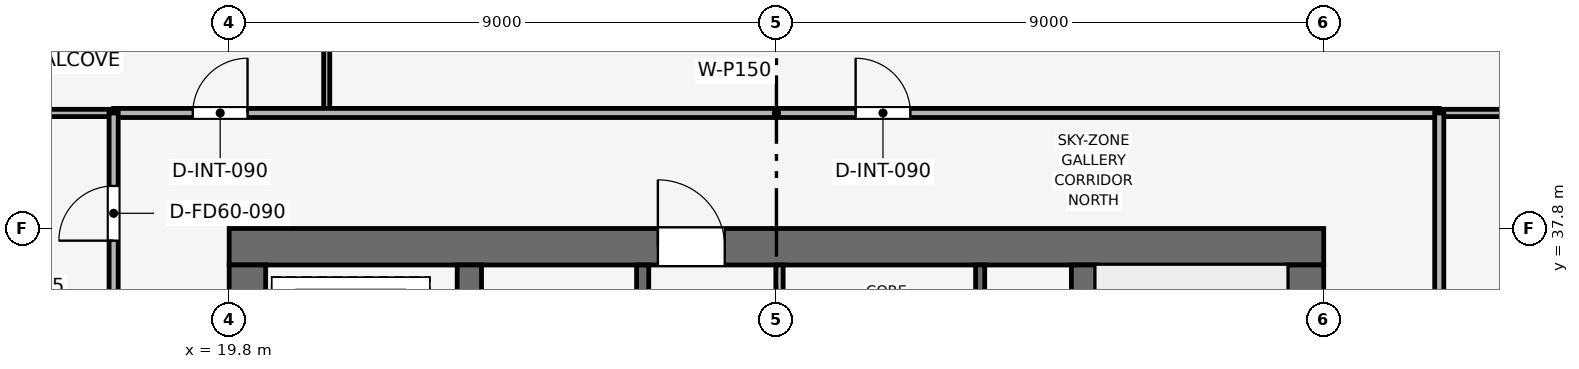
"""IFC4 building model, lengths in metres.
Left out: names, types, materials, properties, quantities, classifications, styles, units other than length and angle.
Written with IfcOpenShell. Run it as: python <this file> out.ifc"""

import sys

from ifc_helpers import new_model, si_unit, direction, frame, frame_2d, origin, place, context, subcontext, project, spatial, rectangle, extrude, element, fill, save


model = new_model("IFC4")
c1 = context("Model", 3, precision=1e-05, world=origin(), true_north=direction((0.0, 1.0)))
c2 = subcontext(c1, "Body", "Model", "MODEL_VIEW")
j1 = project(units=[si_unit("LENGTHUNIT", "METRE"), si_unit("PLANEANGLEUNIT", "RADIAN")], contexts=[c1])
p1 = place(None, origin())
s1 = spatial("IfcSite", under=j1, at=p1, CompositionType="ELEMENT")
p2 = place(p1, origin())
s2 = spatial("IfcBuilding", under=s1, at=p2, CompositionType="ELEMENT")
p3 = place(p2, frame((0.0, 0.0, 306.75)))
s3 = spatial("IfcBuildingStorey", under=s2, at=p3, CompositionType="ELEMENT", Elevation=306.75)
p4 = place(p3, frame((19.8, 37.5, 0.0), z_axis=(0.0, 0.0, 1.0), x_axis=(1.0, 0.0, 0.0)))
e1 = element("IfcWall", 1, at=p4, inside=s3, PredefinedType="SHEAR", context=c2, shape_type="SweptSolid", body=[
    extrude(rectangle(XDim=18.0, YDim=0.6, at=frame_2d((9.0, 0.0))), origin(), (0.0, 0.0, 1.0), 3.75),
])
p5 = place(p4, frame((7.05, 0.0, 0.0)))
e2 = element("IfcOpeningElement", 2, at=p5, cuts=e1, PredefinedType="OPENING", context=c2, shape_type="SweptSolid", body=[
    extrude(rectangle(XDim=1.1, YDim=2.15, at=frame_2d((0.55, 1.075))), frame((0.0, 0.31, 0.0), z_axis=(0.0, -1.0, 0.0), x_axis=(1.0, 0.0, 0.0)), (0.0, 0.0, 1.0), 0.62),
])
p6 = place(p3, frame((20.1, 20.4, 0.0), z_axis=(0.0, 0.0, 1.0), x_axis=(0.0, 1.0, 0.0)))
e3 = element("IfcWall", 3, at=p6, inside=s3, PredefinedType="SHEAR", context=c2, shape_type="SweptSolid", body=[
    extrude(rectangle(XDim=16.8, YDim=0.6, at=frame_2d((8.4, 0.0))), origin(), (0.0, 0.0, 1.0), 3.75),
])
p7 = place(p6, frame((10.4, 0.0, 0.0)))
e4 = element("IfcOpeningElement", 4, at=p7, cuts=e3, PredefinedType="OPENING", context=c2, shape_type="SweptSolid", body=[
    extrude(rectangle(XDim=1.1, YDim=2.15, at=frame_2d((0.55, 1.075))), frame((0.0, 0.31, 0.0), z_axis=(0.0, -1.0, 0.0), x_axis=(1.0, 0.0, 0.0)), (0.0, 0.0, 1.0), 0.62),
])
p8 = place(p3, frame((37.5, 20.4, 0.0), z_axis=(0.0, 0.0, 1.0), x_axis=(0.0, 1.0, 0.0)))
e5 = element("IfcWall", 5, at=p8, inside=s3, PredefinedType="SHEAR", context=c2, shape_type="SweptSolid", body=[
    extrude(rectangle(XDim=16.8, YDim=0.6, at=frame_2d((8.4, 0.0))), origin(), (0.0, 0.0, 1.0), 3.75),
])
p9 = place(p8, frame((4.9, 0.0, 0.0)))
e6 = element("IfcOpeningElement", 6, at=p9, cuts=e5, PredefinedType="OPENING", context=c2, shape_type="SweptSolid", body=[
    extrude(rectangle(XDim=1.1, YDim=2.15, at=frame_2d((0.55, 1.075))), frame((0.0, 0.31, 0.0), z_axis=(0.0, -1.0, 0.0), x_axis=(1.0, 0.0, 0.0)), (0.0, 0.0, 1.0), 0.62),
])
for number, where, z_axis, x_axis in (
    (7, (23.75, 20.4, 0.0), (0.0, 0.0, 1.0), (0.0, 1.0, 0.0)),
    (8, (33.85, 20.4, 0.0), (0.0, 0.0, 1.0), (0.0, 1.0, 0.0)),
):
    element("IfcWall", number, at=place(p3, frame(where, z_axis=z_axis, x_axis=x_axis)), inside=s3, PredefinedType="SHEAR", context=c2, shape_type="SweptSolid", body=[
        extrude(rectangle(XDim=16.8, YDim=0.4, at=frame_2d((8.4, 0.0))), origin(), (0.0, 0.0, 1.0), 3.75),
    ])
p10 = place(p3, frame((32.15, 34.0, 0.0), z_axis=(0.0, 0.0, 1.0), x_axis=(0.0, 1.0, 0.0)))
e9 = element("IfcWall", 9, at=p10, inside=s3, PredefinedType="SHEAR", context=c2, shape_type="SweptSolid", body=[
    extrude(rectangle(XDim=3.2, YDim=0.15, at=frame_2d((1.6, 0.0))), origin(), (0.0, 0.0, 1.0), 3.51),
])
p11 = place(p3, frame((26.6, 34.0, 0.0), z_axis=(0.0, 0.0, 1.0), x_axis=(0.0, 1.0, 0.0)))
e10 = element("IfcWall", 10, at=p11, inside=s3, PredefinedType="SHEAR", context=c2, shape_type="SweptSolid", body=[
    extrude(rectangle(XDim=3.2, YDim=0.2, at=frame_2d((1.6, 0.0))), origin(), (0.0, 0.0, 1.0), 3.51),
])
p12 = place(p11, frame((0.75, 0.0, 0.0)))
e11 = element("IfcOpeningElement", 11, at=p12, cuts=e10, PredefinedType="OPENING", context=c2, shape_type="SweptSolid", body=[
    extrude(rectangle(XDim=1.1, YDim=2.15, at=frame_2d((0.55, 1.075))), frame((0.0, 0.11, 0.0), z_axis=(0.0, -1.0, 0.0), x_axis=(1.0, 0.0, 0.0)), (0.0, 0.0, 1.0), 0.22),
])
p13 = place(p3, frame((28.85, 33.925, 0.0), z_axis=(0.0, 0.0, 1.0), x_axis=(0.0, 1.0, 0.0)))
e12 = element("IfcWall", 12, at=p13, inside=s3, PredefinedType="PARTITIONING", context=c2, shape_type="SweptSolid", body=[
    extrude(rectangle(XDim=3.275, YDim=0.12, at=frame_2d((1.637, 0.0))), origin(), (0.0, 0.0, 1.0), 3.51),
])
p14 = place(p13, frame((0.25, 0.0, 0.0)))
e13 = element("IfcOpeningElement", 13, at=p14, cuts=e12, PredefinedType="OPENING", context=c2, shape_type="SweptSolid", body=[
    extrude(rectangle(XDim=0.85, YDim=2.1, at=frame_2d((0.425, 1.05))), frame((0.0, 0.07, 0.0), z_axis=(0.0, -1.0, 0.0), x_axis=(1.0, 0.0, 0.0)), (0.0, 0.0, 1.0), 0.14),
])
p15 = place(p13, frame((1.795, 0.0, 0.0)))
e14 = element("IfcOpeningElement", 14, at=p15, cuts=e12, PredefinedType="OPENING", context=c2, shape_type="SweptSolid", body=[
    extrude(rectangle(XDim=0.85, YDim=2.1, at=frame_2d((0.425, 1.05))), frame((0.0, 0.07, 0.0), z_axis=(0.0, -1.0, 0.0), x_axis=(1.0, 0.0, 0.0)), (0.0, 0.0, 1.0), 0.14),
])
p16 = place(p3, frame((21.404, 39.7, 0.0), z_axis=(0.0, 0.0, 1.0), x_axis=(0.0, 1.0, 0.0)))
e15 = element("IfcWall", 15, at=p16, inside=s3, PredefinedType="MOVABLE", context=c2, shape_type="SweptSolid", body=[
    extrude(rectangle(XDim=11.77, YDim=0.1, at=frame_2d((5.885, 0.0))), origin(), (0.0, 0.0, 1.0), 3.135),
])
for number, where, z_axis, x_axis in (
    (16, (6.13, 39.7, 0.0), (0.0, 0.0, 1.0), (1.0, 0.0, 0.0)),
    (17, (39.7, 39.7, 0.0), (0.0, 0.0, 1.0), (1.0, 0.0, 0.0)),
):
    element("IfcWall", number, at=place(p3, frame(where, z_axis=z_axis, x_axis=x_axis)), inside=s3, PredefinedType="PARTITIONING", context=c2, shape_type="SweptSolid", body=[
        extrude(rectangle(XDim=11.77, YDim=0.12, at=frame_2d((5.885, 0.0))), origin(), (0.0, 0.0, 1.0), 3.095),
    ])
p17 = place(p3, frame((17.9, 39.7, 0.0), z_axis=(0.0, 0.0, 1.0), x_axis=(1.0, 0.0, 0.0)))
e18 = element("IfcWall", 18, at=p17, inside=s3, PredefinedType="PARTITIONING", context=c2, shape_type="SweptSolid", body=[
    extrude(rectangle(XDim=21.8, YDim=0.15, at=frame_2d((10.9, 0.0))), origin(), (0.0, 0.0, 1.0), 3.095),
])
p18 = place(p17, frame((1.302, 0.0, 0.0)))
e19 = element("IfcOpeningElement", 19, at=p18, cuts=e18, PredefinedType="OPENING", context=c2, shape_type="SweptSolid", body=[
    extrude(rectangle(XDim=0.9, YDim=2.1, at=frame_2d((0.45, 1.05))), frame((0.0, 0.085, 0.0), z_axis=(0.0, -1.0, 0.0), x_axis=(1.0, 0.0, 0.0)), (0.0, 0.0, 1.0), 0.17),
])
p19 = place(p17, frame((12.202, 0.0, 0.0)))
e20 = element("IfcOpeningElement", 20, at=p19, cuts=e18, PredefinedType="OPENING", context=c2, shape_type="SweptSolid", body=[
    extrude(rectangle(XDim=0.9, YDim=2.1, at=frame_2d((0.45, 1.05))), frame((0.0, 0.085, 0.0), z_axis=(0.0, -1.0, 0.0), x_axis=(1.0, 0.0, 0.0)), (0.0, 0.0, 1.0), 0.17),
])
p20 = place(p3, frame((17.9, 12.3, 0.0), z_axis=(0.0, 0.0, 1.0), x_axis=(0.0, 1.0, 0.0)))
e21 = element("IfcWall", 21, at=p20, inside=s3, PredefinedType="PARTITIONING", context=c2, shape_type="SweptSolid", body=[
    extrude(rectangle(XDim=27.4, YDim=0.15, at=frame_2d((13.7, 0.0))), origin(), (0.0, 0.0, 1.0), 3.095),
])
p21 = place(p20, frame((0.7, 0.0, 0.0)))
e22 = element("IfcOpeningElement", 22, at=p21, cuts=e21, PredefinedType="OPENING", context=c2, shape_type="SweptSolid", body=[
    extrude(rectangle(XDim=0.9, YDim=2.1, at=frame_2d((0.45, 1.05))), frame((0.0, 0.085, 0.0), z_axis=(0.0, -1.0, 0.0), x_axis=(1.0, 0.0, 0.0)), (0.0, 0.0, 1.0), 0.17),
])
p22 = place(p20, frame((4.534, 0.0, 0.0)))
e23 = element("IfcOpeningElement", 23, at=p22, cuts=e21, PredefinedType="OPENING", context=c2, shape_type="SweptSolid", body=[
    extrude(rectangle(XDim=0.9, YDim=2.1, at=frame_2d((0.45, 1.05))), frame((0.0, 0.085, 0.0), z_axis=(0.0, -1.0, 0.0), x_axis=(1.0, 0.0, 0.0)), (0.0, 0.0, 1.0), 0.17),
])
p23 = place(p20, frame((11.234, 0.0, 0.0)))
e24 = element("IfcOpeningElement", 24, at=p23, cuts=e21, PredefinedType="OPENING", context=c2, shape_type="SweptSolid", body=[
    extrude(rectangle(XDim=0.9, YDim=2.1, at=frame_2d((0.45, 1.05))), frame((0.0, 0.085, 0.0), z_axis=(0.0, -1.0, 0.0), x_axis=(1.0, 0.0, 0.0)), (0.0, 0.0, 1.0), 0.17),
])
p24 = place(p20, frame((16.65, 0.0, 0.0)))
e25 = element("IfcOpeningElement", 25, at=p24, cuts=e21, PredefinedType="OPENING", context=c2, shape_type="SweptSolid", body=[
    extrude(rectangle(XDim=0.9, YDim=2.1, at=frame_2d((0.45, 1.05))), frame((0.0, 0.085, 0.0), z_axis=(0.0, -1.0, 0.0), x_axis=(1.0, 0.0, 0.0)), (0.0, 0.0, 1.0), 0.17),
])
p25 = place(p20, frame((19.55, 0.0, 0.0)))
e26 = element("IfcOpeningElement", 26, at=p25, cuts=e21, PredefinedType="OPENING", context=c2, shape_type="SweptSolid", body=[
    extrude(rectangle(XDim=0.9, YDim=2.1, at=frame_2d((0.45, 1.05))), frame((0.0, 0.085, 0.0), z_axis=(0.0, -1.0, 0.0), x_axis=(1.0, 0.0, 0.0)), (0.0, 0.0, 1.0), 0.17),
])
p26 = place(p20, frame((22.3, 0.0, 0.0)))
e27 = element("IfcOpeningElement", 27, at=p26, cuts=e21, PredefinedType="OPENING", context=c2, shape_type="SweptSolid", body=[
    extrude(rectangle(XDim=0.95, YDim=2.1, at=frame_2d((0.475, 1.05))), frame((0.0, 0.085, 0.0), z_axis=(0.0, -1.0, 0.0), x_axis=(1.0, 0.0, 0.0)), (0.0, 0.0, 1.0), 0.17),
])
p27 = place(p20, frame((25.3, 0.0, 0.0)))
e28 = element("IfcOpeningElement", 28, at=p27, cuts=e21, PredefinedType="OPENING", context=c2, shape_type="SweptSolid", body=[
    extrude(rectangle(XDim=0.9, YDim=2.1, at=frame_2d((0.45, 1.05))), frame((0.0, 0.085, 0.0), z_axis=(0.0, -1.0, 0.0), x_axis=(1.0, 0.0, 0.0)), (0.0, 0.0, 1.0), 0.17),
])
p28 = place(p3, frame((39.7, 24.4, 0.0), z_axis=(0.0, 0.0, 1.0), x_axis=(0.0, 1.0, 0.0)))
e29 = element("IfcWall", 29, at=p28, inside=s3, PredefinedType="PARTITIONING", context=c2, shape_type="SweptSolid", body=[
    extrude(rectangle(XDim=15.3, YDim=0.15, at=frame_2d((7.65, 0.0))), origin(), (0.0, 0.0, 1.0), 3.095),
])
p29 = place(p28, frame((2.064, 0.0, 0.0)))
e30 = element("IfcOpeningElement", 30, at=p29, cuts=e29, PredefinedType="OPENING", context=c2, shape_type="SweptSolid", body=[
    extrude(rectangle(XDim=0.9, YDim=2.1, at=frame_2d((0.45, 1.05))), frame((0.0, 0.085, 0.0), z_axis=(0.0, -1.0, 0.0), x_axis=(1.0, 0.0, 0.0)), (0.0, 0.0, 1.0), 0.17),
])
p30 = place(p28, frame((9.714, 0.0, 0.0)))
e31 = element("IfcOpeningElement", 31, at=p30, cuts=e29, PredefinedType="OPENING", context=c2, shape_type="SweptSolid", body=[
    extrude(rectangle(XDim=0.9, YDim=2.1, at=frame_2d((0.45, 1.05))), frame((0.0, 0.085, 0.0), z_axis=(0.0, -1.0, 0.0), x_axis=(1.0, 0.0, 0.0)), (0.0, 0.0, 1.0), 0.17),
])
p31 = place(p18, origin())
e32 = element("IfcDoor", 32, at=p31, inside=s3, OperationType="SINGLE_SWING_RIGHT", PredefinedType="DOOR", context=c2, shape_type="SweptSolid", body=[
    extrude(rectangle(XDim=0.9, YDim=2.1, at=frame_2d((0.45, 1.05))), frame((0.0, 0.025, 0.0), z_axis=(0.0, -1.0, 0.0), x_axis=(1.0, 0.0, 0.0)), (0.0, 0.0, 1.0), 0.05),
])
fill(e19, e32)
p32 = place(p19, origin())
e33 = element("IfcDoor", 33, at=p32, inside=s3, OperationType="SINGLE_SWING_LEFT", PredefinedType="DOOR", context=c2, shape_type="SweptSolid", body=[
    extrude(rectangle(XDim=0.9, YDim=2.1, at=frame_2d((0.45, 1.05))), frame((0.0, 0.025, 0.0), z_axis=(0.0, -1.0, 0.0), x_axis=(1.0, 0.0, 0.0)), (0.0, 0.0, 1.0), 0.05),
])
fill(e20, e33)
p33 = place(p27, origin())
e34 = element("IfcDoor", 34, at=p33, inside=s3, OperationType="SINGLE_SWING_LEFT", PredefinedType="DOOR", context=c2, shape_type="SweptSolid", body=[
    extrude(rectangle(XDim=0.9, YDim=2.1, at=frame_2d((0.45, 1.05))), frame((0.0, 0.025, 0.0), z_axis=(0.0, -1.0, 0.0), x_axis=(1.0, 0.0, 0.0)), (0.0, 0.0, 1.0), 0.05),
])
fill(e28, e34)
p34 = place(p5, origin())
e35 = element("IfcDoor", 35, at=p34, inside=s3, OperationType="SINGLE_SWING_LEFT", PredefinedType="DOOR", context=c2, shape_type="SweptSolid", body=[
    extrude(rectangle(XDim=1.1, YDim=2.15, at=frame_2d((0.55, 1.075))), frame((0.0, 0.025, 0.0), z_axis=(0.0, -1.0, 0.0), x_axis=(1.0, 0.0, 0.0)), (0.0, 0.0, 1.0), 0.05),
])
fill(e2, e35)
save(model, sys.argv[1])
